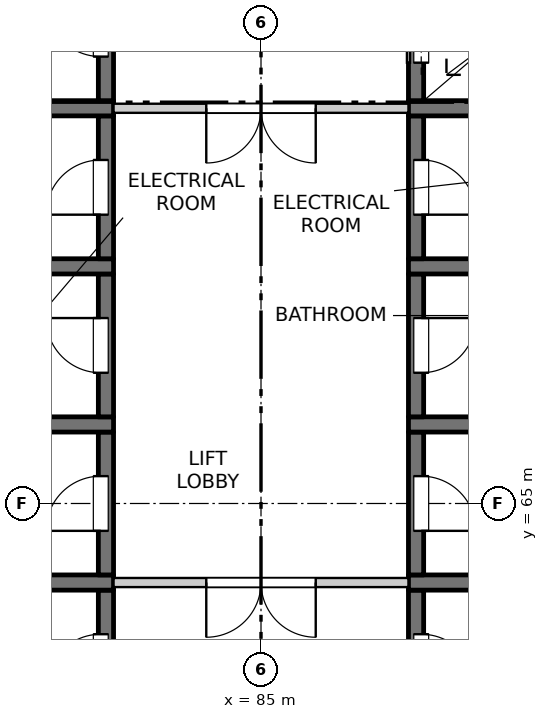
"""IFC4 building model, lengths in metres.
Left out: names, types, materials, properties, quantities, classifications, styles, units other than length and angle.
Written with IfcOpenShell. Run it as: python <this file> out.ifc"""

import sys

from ifc_helpers import new_model, si_unit, direction, frame, frame_2d, origin, place, context, subcontext, project, spatial, rectangle, extrude, element, fill, save


model = new_model("IFC4")
c1 = context("Model", 3, precision=1e-05, world=origin(), true_north=direction((0.0, 1.0)))
c2 = subcontext(c1, "Body", "Model", "MODEL_VIEW")
j1 = project(units=[si_unit("LENGTHUNIT", "METRE"), si_unit("PLANEANGLEUNIT", "RADIAN")], contexts=[c1])
p1 = place(None, origin())
s1 = spatial("IfcSite", under=j1, at=p1, CompositionType="ELEMENT")
p2 = place(p1, origin())
s2 = spatial("IfcBuilding", under=s1, at=p2, CompositionType="ELEMENT")
p3 = place(p2, frame((0.0, 0.0, 238.1)))
s3 = spatial("IfcBuildingStorey", under=s2, at=p3, CompositionType="ELEMENT", Elevation=238.1)
p4 = place(p3, frame((82.45, 61.225, -0.25), z_axis=(0.0, 0.0, 1.0), x_axis=(0.0, 1.0, 0.0)))
e1 = element("IfcWall", 1, at=p4, inside=s3, PredefinedType="SOLIDWALL", context=c2, shape_type="SweptSolid", body=[
    extrude(rectangle(XDim=2.35, YDim=0.25, at=frame_2d((1.175, 0.0))), origin(), (0.0, 0.0, 1.0), 3.35),
])
p5 = place(p4, frame((0.725, 0.0, 0.25)))
e2 = element("IfcOpeningElement", 2, at=p5, cuts=e1, PredefinedType="OPENING", context=c2, shape_type="SweptSolid", body=[
    extrude(rectangle(XDim=0.9, YDim=2.1, at=frame_2d((0.45, 1.05))), frame((0.0, 0.135, 0.0), z_axis=(0.0, -1.0, 0.0), x_axis=(1.0, 0.0, 0.0)), (0.0, 0.0, 1.0), 0.27),
])
p6 = place(p3, frame((79.575, 63.7, -0.25), z_axis=(0.0, 0.0, 1.0), x_axis=(1.0, 0.0, 0.0)))
e3 = element("IfcWall", 3, at=p6, inside=s3, PredefinedType="SOLIDWALL", context=c2, shape_type="SweptSolid", body=[
    extrude(rectangle(XDim=3.0, YDim=0.25, at=frame_2d((1.5, 0.0))), origin(), (0.0, 0.0, 1.0), 3.35),
])
p7 = place(p3, frame((82.45, 63.825, -0.25), z_axis=(0.0, 0.0, 1.0), x_axis=(0.0, 1.0, 0.0)))
e4 = element("IfcWall", 4, at=p7, inside=s3, PredefinedType="SOLIDWALL", context=c2, shape_type="SweptSolid", body=[
    extrude(rectangle(XDim=2.35, YDim=0.25, at=frame_2d((1.175, 0.0))), origin(), (0.0, 0.0, 1.0), 3.35),
])
p8 = place(p7, frame((0.725, 0.0, 0.25)))
e5 = element("IfcOpeningElement", 5, at=p8, cuts=e4, PredefinedType="OPENING", context=c2, shape_type="SweptSolid", body=[
    extrude(rectangle(XDim=0.9, YDim=2.1, at=frame_2d((0.45, 1.05))), frame((0.0, 0.135, 0.0), z_axis=(0.0, -1.0, 0.0), x_axis=(1.0, 0.0, 0.0)), (0.0, 0.0, 1.0), 0.27),
])
p9 = place(p3, frame((79.575, 66.3, -0.25), z_axis=(0.0, 0.0, 1.0), x_axis=(1.0, 0.0, 0.0)))
e6 = element("IfcWall", 6, at=p9, inside=s3, PredefinedType="SOLIDWALL", context=c2, shape_type="SweptSolid", body=[
    extrude(rectangle(XDim=3.0, YDim=0.25, at=frame_2d((1.5, 0.0))), origin(), (0.0, 0.0, 1.0), 3.35),
])
p10 = place(p3, frame((82.45, 66.425, -0.25), z_axis=(0.0, 0.0, 1.0), x_axis=(0.0, 1.0, 0.0)))
e7 = element("IfcWall", 7, at=p10, inside=s3, PredefinedType="SOLIDWALL", context=c2, shape_type="SweptSolid", body=[
    extrude(rectangle(XDim=2.35, YDim=0.25, at=frame_2d((1.175, 0.0))), origin(), (0.0, 0.0, 1.0), 3.35),
])
p11 = place(p10, frame((0.725, 0.0, 0.25)))
e8 = element("IfcOpeningElement", 8, at=p11, cuts=e7, PredefinedType="OPENING", context=c2, shape_type="SweptSolid", body=[
    extrude(rectangle(XDim=0.9, YDim=2.1, at=frame_2d((0.45, 1.05))), frame((0.0, 0.135, 0.0), z_axis=(0.0, -1.0, 0.0), x_axis=(1.0, 0.0, 0.0)), (0.0, 0.0, 1.0), 0.27),
])
p12 = place(p3, frame((79.575, 68.9, -0.25), z_axis=(0.0, 0.0, 1.0), x_axis=(1.0, 0.0, 0.0)))
e9 = element("IfcWall", 9, at=p12, inside=s3, PredefinedType="SOLIDWALL", context=c2, shape_type="SweptSolid", body=[
    extrude(rectangle(XDim=3.0, YDim=0.25, at=frame_2d((1.5, 0.0))), origin(), (0.0, 0.0, 1.0), 3.35),
])
p13 = place(p3, frame((82.45, 69.025, -0.25), z_axis=(0.0, 0.0, 1.0), x_axis=(0.0, 1.0, 0.0)))
e10 = element("IfcWall", 10, at=p13, inside=s3, PredefinedType="SOLIDWALL", context=c2, shape_type="SweptSolid", body=[
    extrude(rectangle(XDim=2.35, YDim=0.25, at=frame_2d((1.175, 0.0))), origin(), (0.0, 0.0, 1.0), 3.35),
])
p14 = place(p13, frame((0.725, 0.0, 0.25)))
e11 = element("IfcOpeningElement", 11, at=p14, cuts=e10, PredefinedType="OPENING", context=c2, shape_type="SweptSolid", body=[
    extrude(rectangle(XDim=0.9, YDim=2.1, at=frame_2d((0.45, 1.05))), frame((0.0, 0.135, 0.0), z_axis=(0.0, -1.0, 0.0), x_axis=(1.0, 0.0, 0.0)), (0.0, 0.0, 1.0), 0.27),
])
p15 = place(p3, frame((79.575, 71.5, -0.25), z_axis=(0.0, 0.0, 1.0), x_axis=(1.0, 0.0, 0.0)))
e12 = element("IfcWall", 12, at=p15, inside=s3, PredefinedType="SOLIDWALL", context=c2, shape_type="SweptSolid", body=[
    extrude(rectangle(XDim=3.0, YDim=0.25, at=frame_2d((1.5, 0.0))), origin(), (0.0, 0.0, 1.0), 3.35),
])
p16 = place(p3, frame((82.45, 71.625, -0.25), z_axis=(0.0, 0.0, 1.0), x_axis=(0.0, 1.0, 0.0)))
e13 = element("IfcWall", 13, at=p16, inside=s3, PredefinedType="SOLIDWALL", context=c2, shape_type="SweptSolid", body=[
    extrude(rectangle(XDim=2.35, YDim=0.25, at=frame_2d((1.175, 0.0))), origin(), (0.0, 0.0, 1.0), 3.35),
])
p17 = place(p16, frame((0.725, 0.0, 0.25)))
e14 = element("IfcOpeningElement", 14, at=p17, cuts=e13, PredefinedType="OPENING", context=c2, shape_type="SweptSolid", body=[
    extrude(rectangle(XDim=0.9, YDim=2.1, at=frame_2d((0.45, 1.05))), frame((0.0, 0.135, 0.0), z_axis=(0.0, -1.0, 0.0), x_axis=(1.0, 0.0, 0.0)), (0.0, 0.0, 1.0), 0.27),
])
p18 = place(p3, frame((87.55, 61.225, -0.25), z_axis=(0.0, 0.0, 1.0), x_axis=(0.0, 1.0, 0.0)))
e15 = element("IfcWall", 15, at=p18, inside=s3, PredefinedType="SOLIDWALL", context=c2, shape_type="SweptSolid", body=[
    extrude(rectangle(XDim=2.35, YDim=0.25, at=frame_2d((1.175, 0.0))), origin(), (0.0, 0.0, 1.0), 3.35),
])
p19 = place(p18, frame((0.725, 0.0, 0.25)))
e16 = element("IfcOpeningElement", 16, at=p19, cuts=e15, PredefinedType="OPENING", context=c2, shape_type="SweptSolid", body=[
    extrude(rectangle(XDim=0.9, YDim=2.1, at=frame_2d((0.45, 1.05))), frame((0.0, 0.135, 0.0), z_axis=(0.0, -1.0, 0.0), x_axis=(1.0, 0.0, 0.0)), (0.0, 0.0, 1.0), 0.27),
])
p20 = place(p3, frame((87.425, 63.7, -0.25), z_axis=(0.0, 0.0, 1.0), x_axis=(1.0, 0.0, 0.0)))
e17 = element("IfcWall", 17, at=p20, inside=s3, PredefinedType="SOLIDWALL", context=c2, shape_type="SweptSolid", body=[
    extrude(rectangle(XDim=3.0, YDim=0.25, at=frame_2d((1.5, 0.0))), origin(), (0.0, 0.0, 1.0), 3.35),
])
p21 = place(p3, frame((87.55, 63.825, -0.25), z_axis=(0.0, 0.0, 1.0), x_axis=(0.0, 1.0, 0.0)))
e18 = element("IfcWall", 18, at=p21, inside=s3, PredefinedType="SOLIDWALL", context=c2, shape_type="SweptSolid", body=[
    extrude(rectangle(XDim=2.35, YDim=0.25, at=frame_2d((1.175, 0.0))), origin(), (0.0, 0.0, 1.0), 3.35),
])
p22 = place(p21, frame((0.725, 0.0, 0.25)))
e19 = element("IfcOpeningElement", 19, at=p22, cuts=e18, PredefinedType="OPENING", context=c2, shape_type="SweptSolid", body=[
    extrude(rectangle(XDim=0.9, YDim=2.1, at=frame_2d((0.45, 1.05))), frame((0.0, 0.135, 0.0), z_axis=(0.0, -1.0, 0.0), x_axis=(1.0, 0.0, 0.0)), (0.0, 0.0, 1.0), 0.27),
])
p23 = place(p3, frame((87.425, 66.3, -0.25), z_axis=(0.0, 0.0, 1.0), x_axis=(1.0, 0.0, 0.0)))
e20 = element("IfcWall", 20, at=p23, inside=s3, PredefinedType="SOLIDWALL", context=c2, shape_type="SweptSolid", body=[
    extrude(rectangle(XDim=3.0, YDim=0.25, at=frame_2d((1.5, 0.0))), origin(), (0.0, 0.0, 1.0), 3.35),
])
p24 = place(p3, frame((87.55, 66.425, -0.25), z_axis=(0.0, 0.0, 1.0), x_axis=(0.0, 1.0, 0.0)))
e21 = element("IfcWall", 21, at=p24, inside=s3, PredefinedType="SOLIDWALL", context=c2, shape_type="SweptSolid", body=[
    extrude(rectangle(XDim=2.35, YDim=0.25, at=frame_2d((1.175, 0.0))), origin(), (0.0, 0.0, 1.0), 3.35),
])
p25 = place(p24, frame((0.725, 0.0, 0.25)))
e22 = element("IfcOpeningElement", 22, at=p25, cuts=e21, PredefinedType="OPENING", context=c2, shape_type="SweptSolid", body=[
    extrude(rectangle(XDim=0.9, YDim=2.1, at=frame_2d((0.45, 1.05))), frame((0.0, 0.135, 0.0), z_axis=(0.0, -1.0, 0.0), x_axis=(1.0, 0.0, 0.0)), (0.0, 0.0, 1.0), 0.27),
])
p26 = place(p3, frame((87.425, 68.9, -0.25), z_axis=(0.0, 0.0, 1.0), x_axis=(1.0, 0.0, 0.0)))
e23 = element("IfcWall", 23, at=p26, inside=s3, PredefinedType="SOLIDWALL", context=c2, shape_type="SweptSolid", body=[
    extrude(rectangle(XDim=3.0, YDim=0.25, at=frame_2d((1.5, 0.0))), origin(), (0.0, 0.0, 1.0), 3.35),
])
p27 = place(p3, frame((87.55, 69.025, -0.25), z_axis=(0.0, 0.0, 1.0), x_axis=(0.0, 1.0, 0.0)))
e24 = element("IfcWall", 24, at=p27, inside=s3, PredefinedType="SOLIDWALL", context=c2, shape_type="SweptSolid", body=[
    extrude(rectangle(XDim=2.35, YDim=0.25, at=frame_2d((1.175, 0.0))), origin(), (0.0, 0.0, 1.0), 3.35),
])
p28 = place(p27, frame((0.725, 0.0, 0.25)))
e25 = element("IfcOpeningElement", 25, at=p28, cuts=e24, PredefinedType="OPENING", context=c2, shape_type="SweptSolid", body=[
    extrude(rectangle(XDim=0.9, YDim=2.1, at=frame_2d((0.45, 1.05))), frame((0.0, 0.135, 0.0), z_axis=(0.0, -1.0, 0.0), x_axis=(1.0, 0.0, 0.0)), (0.0, 0.0, 1.0), 0.27),
])
p29 = place(p3, frame((87.425, 71.5, -0.25), z_axis=(0.0, 0.0, 1.0), x_axis=(1.0, 0.0, 0.0)))
e26 = element("IfcWall", 26, at=p29, inside=s3, PredefinedType="SOLIDWALL", context=c2, shape_type="SweptSolid", body=[
    extrude(rectangle(XDim=3.0, YDim=0.25, at=frame_2d((1.5, 0.0))), origin(), (0.0, 0.0, 1.0), 3.35),
])
p30 = place(p3, frame((87.55, 71.625, -0.25), z_axis=(0.0, 0.0, 1.0), x_axis=(0.0, 1.0, 0.0)))
e27 = element("IfcWall", 27, at=p30, inside=s3, PredefinedType="SOLIDWALL", context=c2, shape_type="SweptSolid", body=[
    extrude(rectangle(XDim=2.35, YDim=0.25, at=frame_2d((1.175, 0.0))), origin(), (0.0, 0.0, 1.0), 3.35),
])
p31 = place(p30, frame((0.625, 0.0, 0.25)))
e28 = element("IfcOpeningElement", 28, at=p31, cuts=e27, PredefinedType="OPENING", context=c2, shape_type="SweptSolid", body=[
    extrude(rectangle(XDim=1.1, YDim=2.1, at=frame_2d((0.55, 1.05))), frame((0.0, 0.135, 0.0), z_axis=(0.0, -1.0, 0.0), x_axis=(1.0, 0.0, 0.0)), (0.0, 0.0, 1.0), 0.27),
])
p32 = place(p3, frame((82.575, 63.7, 0.0), z_axis=(0.0, 0.0, 1.0), x_axis=(1.0, 0.0, 0.0)))
e29 = element("IfcWall", 29, at=p32, inside=s3, PredefinedType="PARTITIONING", context=c2, shape_type="SweptSolid", body=[
    extrude(rectangle(XDim=4.85, YDim=0.15, at=frame_2d((2.425, 0.0))), origin(), (0.0, 0.0, 1.0), 3.1),
])
p33 = place(p32, frame((1.525, 0.0, 0.0)))
e30 = element("IfcOpeningElement", 30, at=p33, cuts=e29, PredefinedType="OPENING", context=c2, shape_type="SweptSolid", body=[
    extrude(rectangle(XDim=1.8, YDim=2.1, at=frame_2d((0.9, 1.05))), frame((0.0, 0.085, 0.0), z_axis=(0.0, -1.0, 0.0), x_axis=(1.0, 0.0, 0.0)), (0.0, 0.0, 1.0), 0.17),
])
p34 = place(p3, frame((82.575, 71.5, 0.0), z_axis=(0.0, 0.0, 1.0), x_axis=(1.0, 0.0, 0.0)))
e31 = element("IfcWall", 31, at=p34, inside=s3, PredefinedType="PARTITIONING", context=c2, shape_type="SweptSolid", body=[
    extrude(rectangle(XDim=4.85, YDim=0.15, at=frame_2d((2.425, 0.0))), origin(), (0.0, 0.0, 1.0), 3.1),
])
p35 = place(p34, frame((1.525, 0.0, 0.0)))
e32 = element("IfcOpeningElement", 32, at=p35, cuts=e31, PredefinedType="OPENING", context=c2, shape_type="SweptSolid", body=[
    extrude(rectangle(XDim=1.8, YDim=2.1, at=frame_2d((0.9, 1.05))), frame((0.0, 0.085, 0.0), z_axis=(0.0, -1.0, 0.0), x_axis=(1.0, 0.0, 0.0)), (0.0, 0.0, 1.0), 0.17),
])
p36 = place(p5, origin())
e33 = element("IfcDoor", 33, at=p36, inside=s3, OperationType="SINGLE_SWING_LEFT", PredefinedType="DOOR", context=c2, shape_type="SweptSolid", body=[
    extrude(rectangle(XDim=0.9, YDim=2.1, at=frame_2d((0.45, 1.05))), frame((0.0, 0.11, 0.0), z_axis=(0.0, -1.0, 0.0), x_axis=(1.0, 0.0, 0.0)), (0.0, 0.0, 1.0), 0.05),
])
fill(e2, e33)
p37 = place(p19, origin())
e34 = element("IfcDoor", 34, at=p37, inside=s3, OperationType="SINGLE_SWING_RIGHT", PredefinedType="DOOR", context=c2, shape_type="SweptSolid", body=[
    extrude(rectangle(XDim=0.9, YDim=2.1, at=frame_2d((0.45, 1.05))), frame((0.0, -0.06, 0.0), z_axis=(0.0, -1.0, 0.0), x_axis=(1.0, 0.0, 0.0)), (0.0, 0.0, 1.0), 0.05),
])
fill(e16, e34)
p38 = place(p33, origin())
e35 = element("IfcDoor", 35, at=p38, inside=s3, OperationType="DOUBLE_DOOR_SINGLE_SWING", PredefinedType="DOOR", context=c2, shape_type="SweptSolid", body=[
    extrude(rectangle(XDim=1.8, YDim=2.1, at=frame_2d((0.9, 1.05))), frame((0.0, 0.025, 0.0), z_axis=(0.0, -1.0, 0.0), x_axis=(1.0, 0.0, 0.0)), (0.0, 0.0, 1.0), 0.05),
])
fill(e30, e35)
p39 = place(p8, origin())
e36 = element("IfcDoor", 36, at=p39, inside=s3, OperationType="SINGLE_SWING_LEFT", PredefinedType="DOOR", context=c2, shape_type="SweptSolid", body=[
    extrude(rectangle(XDim=0.9, YDim=2.1, at=frame_2d((0.45, 1.05))), frame((0.0, 0.11, 0.0), z_axis=(0.0, -1.0, 0.0), x_axis=(1.0, 0.0, 0.0)), (0.0, 0.0, 1.0), 0.05),
])
fill(e5, e36)
p40 = place(p22, origin())
e37 = element("IfcDoor", 37, at=p40, inside=s3, OperationType="SINGLE_SWING_RIGHT", PredefinedType="DOOR", context=c2, shape_type="SweptSolid", body=[
    extrude(rectangle(XDim=0.9, YDim=2.1, at=frame_2d((0.45, 1.05))), frame((0.0, -0.06, 0.0), z_axis=(0.0, -1.0, 0.0), x_axis=(1.0, 0.0, 0.0)), (0.0, 0.0, 1.0), 0.05),
])
fill(e19, e37)
p41 = place(p11, origin())
e38 = element("IfcDoor", 38, at=p41, inside=s3, OperationType="SINGLE_SWING_RIGHT", PredefinedType="DOOR", context=c2, shape_type="SweptSolid", body=[
    extrude(rectangle(XDim=0.9, YDim=2.1, at=frame_2d((0.45, 1.05))), frame((0.0, 0.11, 0.0), z_axis=(0.0, -1.0, 0.0), x_axis=(1.0, 0.0, 0.0)), (0.0, 0.0, 1.0), 0.05),
])
fill(e8, e38)
p42 = place(p25, origin())
e39 = element("IfcDoor", 39, at=p42, inside=s3, OperationType="SINGLE_SWING_LEFT", PredefinedType="DOOR", context=c2, shape_type="SweptSolid", body=[
    extrude(rectangle(XDim=0.9, YDim=2.1, at=frame_2d((0.45, 1.05))), frame((0.0, -0.06, 0.0), z_axis=(0.0, -1.0, 0.0), x_axis=(1.0, 0.0, 0.0)), (0.0, 0.0, 1.0), 0.05),
])
fill(e22, e39)
p43 = place(p14, origin())
e40 = element("IfcDoor", 40, at=p43, inside=s3, OperationType="SINGLE_SWING_LEFT", PredefinedType="DOOR", context=c2, shape_type="SweptSolid", body=[
    extrude(rectangle(XDim=0.9, YDim=2.1, at=frame_2d((0.45, 1.05))), frame((0.0, 0.11, 0.0), z_axis=(0.0, -1.0, 0.0), x_axis=(1.0, 0.0, 0.0)), (0.0, 0.0, 1.0), 0.05),
])
fill(e11, e40)
p44 = place(p28, origin())
e41 = element("IfcDoor", 41, at=p44, inside=s3, OperationType="SINGLE_SWING_RIGHT", PredefinedType="DOOR", context=c2, shape_type="SweptSolid", body=[
    extrude(rectangle(XDim=0.9, YDim=2.1, at=frame_2d((0.45, 1.05))), frame((0.0, -0.06, 0.0), z_axis=(0.0, -1.0, 0.0), x_axis=(1.0, 0.0, 0.0)), (0.0, 0.0, 1.0), 0.05),
])
fill(e25, e41)
p45 = place(p35, origin())
e42 = element("IfcDoor", 42, at=p45, inside=s3, OperationType="DOUBLE_DOOR_SINGLE_SWING", PredefinedType="DOOR", context=c2, shape_type="SweptSolid", body=[
    extrude(rectangle(XDim=1.8, YDim=2.1, at=frame_2d((0.9, 1.05))), frame((0.0, 0.025, 0.0), z_axis=(0.0, -1.0, 0.0), x_axis=(1.0, 0.0, 0.0)), (0.0, 0.0, 1.0), 0.05),
])
fill(e32, e42)
p46 = place(p17, origin())
e43 = element("IfcDoor", 43, at=p46, inside=s3, OperationType="SINGLE_SWING_RIGHT", PredefinedType="DOOR", context=c2, shape_type="SweptSolid", body=[
    extrude(rectangle(XDim=0.9, YDim=2.1, at=frame_2d((0.45, 1.05))), frame((0.0, 0.11, 0.0), z_axis=(0.0, -1.0, 0.0), x_axis=(1.0, 0.0, 0.0)), (0.0, 0.0, 1.0), 0.05),
])
fill(e14, e43)
p47 = place(p31, origin())
e44 = element("IfcDoor", 44, at=p47, inside=s3, OperationType="SLIDING_TO_LEFT", PredefinedType="DOOR", context=c2, shape_type="SweptSolid", body=[
    extrude(rectangle(XDim=1.1, YDim=2.1, at=frame_2d((0.55, 1.05))), frame((0.0, -0.06, 0.0), z_axis=(0.0, -1.0, 0.0), x_axis=(1.0, 0.0, 0.0)), (0.0, 0.0, 1.0), 0.05),
])
fill(e28, e44)
save(model, sys.argv[1])
